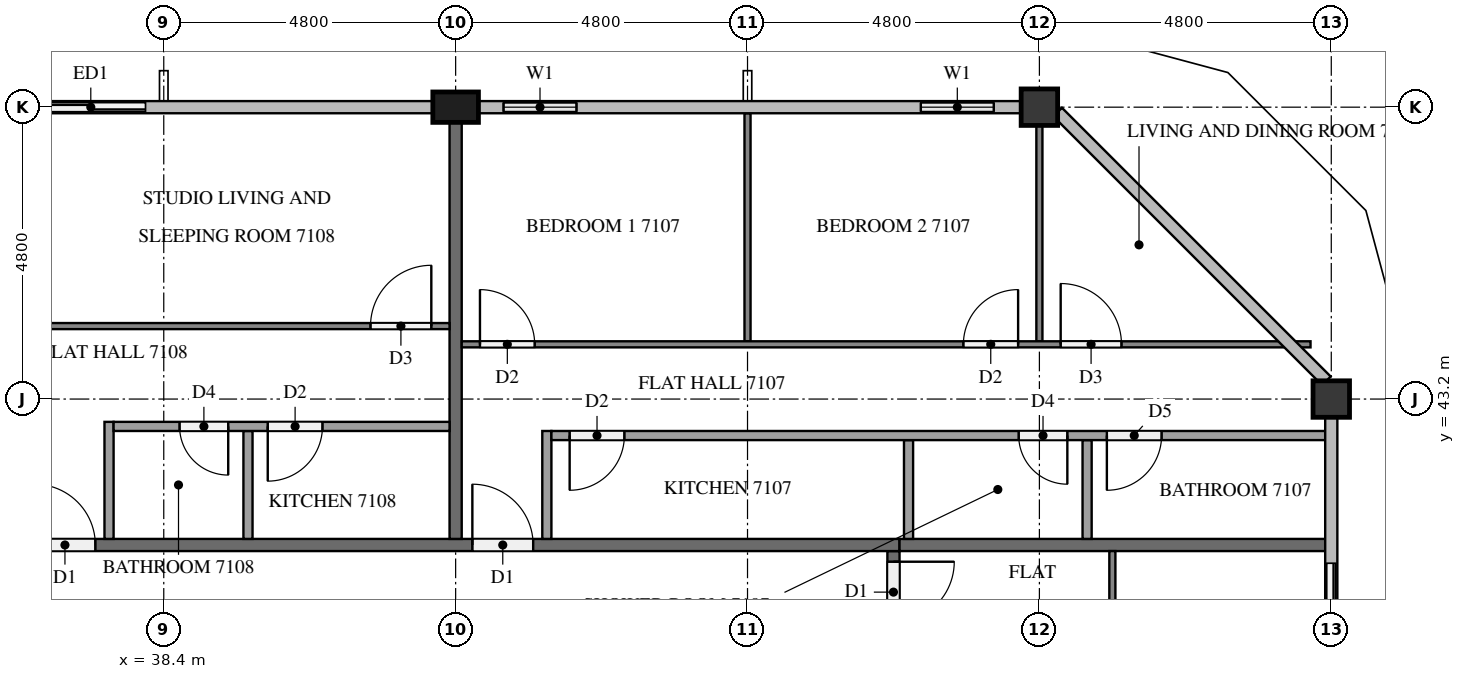
"""IFC4 building model, lengths in metres.
Left out: names, types, materials, properties, quantities, classifications, styles, units other than length and angle.
Written with IfcOpenShell. Run it as: python <this file> out.ifc"""

import sys

from ifc_helpers import new_model, si_unit, direction, frame, frame_2d, origin, origin_2d, place, context, subcontext, project, spatial, rectangle, extrude, element, fill, save


model = new_model("IFC4")
c1 = context("Model", 3, precision=1e-05, world=origin(), true_north=direction((0.0, 1.0)))
c2 = subcontext(c1, "Body", "Model", "MODEL_VIEW")
j1 = project(units=[si_unit("LENGTHUNIT", "METRE"), si_unit("PLANEANGLEUNIT", "RADIAN")], contexts=[c1])
p1 = place(None, origin())
s1 = spatial("IfcSite", under=j1, at=p1, CompositionType="ELEMENT")
p2 = place(p1, origin())
s2 = spatial("IfcBuilding", under=s1, at=p2, CompositionType="ELEMENT")
p3 = place(p2, frame((0.0, 0.0, 272.1)))
s3 = spatial("IfcBuildingStorey", under=s2, at=p3, CompositionType="ELEMENT", Elevation=272.1)
for number, where, z_axis, x_axis in (
    (1, (57.6, 43.2, 0.0), (0.0, 0.0, 1.0), (1.0, 0.0, 0.0)),
    (2, (52.8, 48.0, 0.0), (0.0, 0.0, 1.0), (1.0, 0.0, 0.0)),
):
    element("IfcColumn", number, at=place(p3, frame(where, z_axis=z_axis, x_axis=x_axis)), inside=s3, PredefinedType="COLUMN", context=c2, shape_type="SweptSolid", body=[
        extrude(rectangle(XDim=0.6, YDim=0.6, at=origin_2d()), origin(), (0.0, 0.0, 1.0), 3.2),
    ])
p4 = place(p3, frame((43.2, 48.0, 0.0), z_axis=(0.0, 0.0, 1.0), x_axis=(1.0, 0.0, 0.0)))
e3 = element("IfcColumn", 3, at=p4, inside=s3, PredefinedType="COLUMN", context=c2, shape_type="SweptSolid", body=[
    extrude(rectangle(XDim=0.75, YDim=0.5, at=origin_2d()), origin(), (0.0, 0.0, 1.0), 3.2),
])
p5 = place(p3, frame((57.6, 38.4, 0.0), z_axis=(0.0, 0.0, 1.0), x_axis=(0.0, 1.0, 0.0)))
e4 = element("IfcWall", 4, at=p5, inside=s3, PredefinedType="SOLIDWALL", context=c2, shape_type="SweptSolid", body=[
    extrude(rectangle(XDim=2.4, YDim=0.15, at=frame_2d((1.2, 0.0))), origin(), (0.0, 0.0, 1.0), 3.2),
])
p6 = place(p5, frame((0.3, 0.0, 0.0)))
e5 = element("IfcOpeningElement", 5, at=p6, cuts=e4, PredefinedType="OPENING", context=c2, shape_type="SweptSolid", body=[
    extrude(rectangle(XDim=1.8, YDim=2.4, at=frame_2d((0.9, 1.2))), frame((0.0, 0.085, 0.0), z_axis=(0.0, -1.0, 0.0), x_axis=(1.0, 0.0, 0.0)), (0.0, 0.0, 1.0), 0.17),
])
p7 = place(p3, frame((52.5, 48.0, 0.0), z_axis=(0.0, 0.0, 1.0), x_axis=(-1.0, 0.0, 0.0)))
e6 = element("IfcWall", 6, at=p7, inside=s3, PredefinedType="SOLIDWALL", context=c2, shape_type="SweptSolid", body=[
    extrude(rectangle(XDim=2.1, YDim=0.15, at=frame_2d((1.05, 0.0))), origin(), (0.0, 0.0, 1.0), 3.2),
])
p8 = place(p7, frame((0.45, 0.0, 0.9)))
e7 = element("IfcOpeningElement", 7, at=p8, cuts=e6, PredefinedType="OPENING", context=c2, shape_type="SweptSolid", body=[
    extrude(rectangle(XDim=1.2, YDim=1.4, at=frame_2d((0.6, 0.7))), frame((0.0, 0.085, 0.0), z_axis=(0.0, -1.0, 0.0), x_axis=(1.0, 0.0, 0.0)), (0.0, 0.0, 1.0), 0.17),
])
p9 = place(p3, frame((45.6, 48.0, 0.0), z_axis=(0.0, 0.0, 1.0), x_axis=(-1.0, 0.0, 0.0)))
e8 = element("IfcWall", 8, at=p9, inside=s3, PredefinedType="SOLIDWALL", context=c2, shape_type="SweptSolid", body=[
    extrude(rectangle(XDim=2.025, YDim=0.15, at=frame_2d((1.013, 0.0))), origin(), (0.0, 0.0, 1.0), 3.2),
])
p10 = place(p9, frame((0.413, 0.0, 0.9)))
e9 = element("IfcOpeningElement", 9, at=p10, cuts=e8, PredefinedType="OPENING", context=c2, shape_type="SweptSolid", body=[
    extrude(rectangle(XDim=1.2, YDim=1.4, at=frame_2d((0.6, 0.7))), frame((0.0, 0.085, 0.0), z_axis=(0.0, -1.0, 0.0), x_axis=(1.0, 0.0, 0.0)), (0.0, 0.0, 1.0), 0.17),
])
p11 = place(p3, frame((38.4, 48.0, 0.0), z_axis=(0.0, 0.0, 1.0), x_axis=(-1.0, 0.0, 0.0)))
e10 = element("IfcWall", 10, at=p11, inside=s3, PredefinedType="SOLIDWALL", context=c2, shape_type="SweptSolid", body=[
    extrude(rectangle(XDim=2.4, YDim=0.15, at=frame_2d((1.2, 0.0))), origin(), (0.0, 0.0, 1.0), 3.2),
])
p12 = place(p11, frame((0.3, 0.0, 0.0)))
e11 = element("IfcOpeningElement", 11, at=p12, cuts=e10, PredefinedType="OPENING", context=c2, shape_type="SweptSolid", body=[
    extrude(rectangle(XDim=1.8, YDim=2.4, at=frame_2d((0.9, 1.2))), frame((0.0, 0.085, 0.0), z_axis=(0.0, -1.0, 0.0), x_axis=(1.0, 0.0, 0.0)), (0.0, 0.0, 1.0), 0.17),
])
p13 = place(p3, frame((50.4, 40.7, 0.0), z_axis=(0.0, 0.0, 1.0), x_axis=(0.0, -1.0, 0.0)))
e12 = element("IfcWall", 12, at=p13, inside=s3, PredefinedType="PARTITIONING", context=c2, shape_type="SweptSolid", body=[
    extrude(rectangle(XDim=28.6, YDim=0.2, at=frame_2d((14.3, 0.0))), origin(), (0.0, 0.0, 1.0), 3.2),
])
p14 = place(p13, frame((27.425, 0.0, 0.0)))
e13 = element("IfcOpeningElement", 13, at=p14, cuts=e12, PredefinedType="OPENING", context=c2, shape_type="SweptSolid", body=[
    extrude(rectangle(XDim=1.0, YDim=2.1, at=frame_2d((0.5, 1.05))), frame((0.0, 0.11, 0.0), z_axis=(0.0, -1.0, 0.0), x_axis=(1.0, 0.0, 0.0)), (0.0, 0.0, 1.0), 0.22),
])
p15 = place(p13, frame((0.175, 0.0, 0.0)))
e14 = element("IfcOpeningElement", 14, at=p15, cuts=e12, PredefinedType="OPENING", context=c2, shape_type="SweptSolid", body=[
    extrude(rectangle(XDim=1.0, YDim=2.1, at=frame_2d((0.5, 1.05))), frame((0.0, 0.11, 0.0), z_axis=(0.0, -1.0, 0.0), x_axis=(1.0, 0.0, 0.0)), (0.0, 0.0, 1.0), 0.22),
])
p16 = place(p3, frame((11.9, 40.8, 0.0), z_axis=(0.0, 0.0, 1.0), x_axis=(1.0, 0.0, 0.0)))
e15 = element("IfcWall", 15, at=p16, inside=s3, PredefinedType="PARTITIONING", context=c2, shape_type="SweptSolid", body=[
    extrude(rectangle(XDim=38.6, YDim=0.2, at=frame_2d((19.3, 0.0))), origin(), (0.0, 0.0, 1.0), 3.2),
])
p17 = place(p16, frame((31.575, 0.0, 0.0)))
e16 = element("IfcOpeningElement", 16, at=p17, cuts=e15, PredefinedType="OPENING", context=c2, shape_type="SweptSolid", body=[
    extrude(rectangle(XDim=1.0, YDim=2.1, at=frame_2d((0.5, 1.05))), frame((0.0, 0.11, 0.0), z_axis=(0.0, -1.0, 0.0), x_axis=(1.0, 0.0, 0.0)), (0.0, 0.0, 1.0), 0.22),
])
p18 = place(p16, frame((24.375, 0.0, 0.0)))
e17 = element("IfcOpeningElement", 17, at=p18, cuts=e15, PredefinedType="OPENING", context=c2, shape_type="SweptSolid", body=[
    extrude(rectangle(XDim=1.0, YDim=2.1, at=frame_2d((0.5, 1.05))), frame((0.0, 0.11, 0.0), z_axis=(0.0, -1.0, 0.0), x_axis=(1.0, 0.0, 0.0)), (0.0, 0.0, 1.0), 0.22),
])
p19 = place(p16, frame((22.825, 0.0, 0.0)))
e18 = element("IfcOpeningElement", 18, at=p19, cuts=e15, PredefinedType="OPENING", context=c2, shape_type="SweptSolid", body=[
    extrude(rectangle(XDim=1.0, YDim=2.1, at=frame_2d((0.5, 1.05))), frame((0.0, 0.11, 0.0), z_axis=(0.0, -1.0, 0.0), x_axis=(1.0, 0.0, 0.0)), (0.0, 0.0, 1.0), 0.22),
])
p20 = place(p16, frame((0.375, 0.0, 0.0)))
e19 = element("IfcOpeningElement", 19, at=p20, cuts=e15, PredefinedType="OPENING", context=c2, shape_type="SweptSolid", body=[
    extrude(rectangle(XDim=1.0, YDim=2.1, at=frame_2d((0.5, 1.05))), frame((0.0, 0.11, 0.0), z_axis=(0.0, -1.0, 0.0), x_axis=(1.0, 0.0, 0.0)), (0.0, 0.0, 1.0), 0.22),
])
p21 = place(p3, frame((50.5, 40.8, 0.0), z_axis=(0.0, 0.0, 1.0), x_axis=(1.0, 0.0, 0.0)))
e20 = element("IfcWall", 20, at=p21, inside=s3, PredefinedType="PARTITIONING", context=c2, shape_type="SweptSolid", body=[
    extrude(rectangle(XDim=7.0, YDim=0.2, at=frame_2d((3.5, 0.0))), origin(), (0.0, 0.0, 1.0), 3.2),
])
p22 = place(p3, frame((43.2, 47.75, 0.0), z_axis=(0.0, 0.0, 1.0), x_axis=(0.0, -1.0, 0.0)))
e21 = element("IfcWall", 21, at=p22, inside=s3, PredefinedType="PARTITIONING", context=c2, shape_type="SweptSolid", body=[
    extrude(rectangle(XDim=6.85, YDim=0.2, at=frame_2d((3.425, 0.0))), origin(), (0.0, 0.0, 1.0), 3.2),
])
p23 = place(p3, frame((54.0, 40.7, 0.0), z_axis=(0.0, 0.0, 1.0), x_axis=(0.0, -1.0, 0.0)))
e22 = element("IfcWall", 22, at=p23, inside=s3, PredefinedType="PARTITIONING", context=c2, shape_type="SweptSolid", body=[
    extrude(rectangle(XDim=11.8, YDim=0.1, at=frame_2d((5.9, 0.0))), origin(), (0.0, 0.0, 1.0), 3.2),
])
p24 = place(p23, frame((5.75, 0.0, 0.0)))
e23 = element("IfcOpeningElement", 23, at=p24, cuts=e22, PredefinedType="OPENING", context=c2, shape_type="SweptSolid", body=[
    extrude(rectangle(XDim=1.0, YDim=2.1, at=frame_2d((0.5, 1.05))), frame((0.0, 0.06, 0.0), z_axis=(0.0, -1.0, 0.0), x_axis=(1.0, 0.0, 0.0)), (0.0, 0.0, 1.0), 0.12),
])
p25 = place(p23, frame((7.45, 0.0, 0.0)))
e24 = element("IfcOpeningElement", 24, at=p25, cuts=e22, PredefinedType="OPENING", context=c2, shape_type="SweptSolid", body=[
    extrude(rectangle(XDim=0.9, YDim=2.1, at=frame_2d((0.45, 1.05))), frame((0.0, 0.06, 0.0), z_axis=(0.0, -1.0, 0.0), x_axis=(1.0, 0.0, 0.0)), (0.0, 0.0, 1.0), 0.12),
])
p26 = place(p3, frame((48.0, 44.15, 0.0), z_axis=(0.0, 0.0, 1.0), x_axis=(0.0, 1.0, 0.0)))
e25 = element("IfcWall", 25, at=p26, inside=s3, PredefinedType="PARTITIONING", context=c2, shape_type="SweptSolid", body=[
    extrude(rectangle(XDim=3.75, YDim=0.1, at=frame_2d((1.875, 0.0))), origin(), (0.0, 0.0, 1.0), 3.2),
])
p27 = place(p3, frame((52.8, 44.15, 0.0), z_axis=(0.0, 0.0, 1.0), x_axis=(0.0, 1.0, 0.0)))
e26 = element("IfcWall", 26, at=p27, inside=s3, PredefinedType="PARTITIONING", context=c2, shape_type="SweptSolid", body=[
    extrude(rectangle(XDim=3.55, YDim=0.1, at=frame_2d((1.775, 0.0))), origin(), (0.0, 0.0, 1.0), 3.2),
])
p28 = place(p3, frame((43.3, 44.1, 0.0), z_axis=(0.0, 0.0, 1.0), x_axis=(1.0, 0.0, 0.0)))
e27 = element("IfcWall", 27, at=p28, inside=s3, PredefinedType="PARTITIONING", context=c2, shape_type="SweptSolid", body=[
    extrude(rectangle(XDim=13.959, YDim=0.1, at=frame_2d((6.979, 0.0))), origin(), (0.0, 0.0, 1.0), 3.2),
])
p29 = place(p28, frame((0.3, 0.0, 0.0)))
e28 = element("IfcOpeningElement", 28, at=p29, cuts=e27, PredefinedType="OPENING", context=c2, shape_type="SweptSolid", body=[
    extrude(rectangle(XDim=0.9, YDim=2.1, at=frame_2d((0.45, 1.05))), frame((0.0, 0.06, 0.0), z_axis=(0.0, -1.0, 0.0), x_axis=(1.0, 0.0, 0.0)), (0.0, 0.0, 1.0), 0.12),
])
p30 = place(p28, frame((8.25, 0.0, 0.0)))
e29 = element("IfcOpeningElement", 29, at=p30, cuts=e27, PredefinedType="OPENING", context=c2, shape_type="SweptSolid", body=[
    extrude(rectangle(XDim=0.9, YDim=2.1, at=frame_2d((0.45, 1.05))), frame((0.0, 0.06, 0.0), z_axis=(0.0, -1.0, 0.0), x_axis=(1.0, 0.0, 0.0)), (0.0, 0.0, 1.0), 0.12),
])
p31 = place(p28, frame((9.85, 0.0, 0.0)))
e30 = element("IfcOpeningElement", 30, at=p31, cuts=e27, PredefinedType="OPENING", context=c2, shape_type="SweptSolid", body=[
    extrude(rectangle(XDim=1.0, YDim=2.1, at=frame_2d((0.5, 1.05))), frame((0.0, 0.06, 0.0), z_axis=(0.0, -1.0, 0.0), x_axis=(1.0, 0.0, 0.0)), (0.0, 0.0, 1.0), 0.12),
])
for number, where, z_axis, x_axis in (
    (31, (50.648, 40.9, 0.0), (0.0, 0.0, 1.0), (0.0, 1.0, 0.0)),
    (32, (53.585, 40.9, 0.0), (0.0, 0.0, 1.0), (0.0, 1.0, 0.0)),
):
    element("IfcWall", number, at=place(p3, frame(where, z_axis=z_axis, x_axis=x_axis)), inside=s3, PredefinedType="PARTITIONING", context=c2, shape_type="SweptSolid", body=[
        extrude(rectangle(XDim=1.625, YDim=0.15, at=frame_2d((0.812, 0.0))), origin(), (0.0, 0.0, 1.0), 3.2),
    ])
p32 = place(p3, frame((44.7, 40.9, 0.0), z_axis=(0.0, 0.0, 1.0), x_axis=(0.0, 1.0, 0.0)))
e33 = element("IfcWall", 33, at=p32, inside=s3, PredefinedType="PARTITIONING", context=c2, shape_type="SweptSolid", body=[
    extrude(rectangle(XDim=1.775, YDim=0.15, at=frame_2d((0.888, 0.0))), origin(), (0.0, 0.0, 1.0), 3.2),
])
p33 = place(p3, frame((57.5, 42.6, 0.0), z_axis=(0.0, 0.0, 1.0), x_axis=(-1.0, 0.0, 0.0)))
e34 = element("IfcWall", 34, at=p33, inside=s3, PredefinedType="PARTITIONING", context=c2, shape_type="SweptSolid", body=[
    extrude(rectangle(XDim=12.725, YDim=0.15, at=frame_2d((6.363, 0.0))), origin(), (0.0, 0.0, 1.0), 3.2),
])
p34 = place(p33, frame((11.525, 0.0, 0.0)))
e35 = element("IfcOpeningElement", 35, at=p34, cuts=e34, PredefinedType="OPENING", context=c2, shape_type="SweptSolid", body=[
    extrude(rectangle(XDim=0.9, YDim=2.1, at=frame_2d((0.45, 1.05))), frame((0.0, 0.085, 0.0), z_axis=(0.0, -1.0, 0.0), x_axis=(1.0, 0.0, 0.0)), (0.0, 0.0, 1.0), 0.17),
])
p35 = place(p33, frame((4.24, 0.0, 0.0)))
e36 = element("IfcOpeningElement", 36, at=p35, cuts=e34, PredefinedType="OPENING", context=c2, shape_type="SweptSolid", body=[
    extrude(rectangle(XDim=0.8, YDim=2.1, at=frame_2d((0.4, 1.05))), frame((0.0, 0.085, 0.0), z_axis=(0.0, -1.0, 0.0), x_axis=(1.0, 0.0, 0.0)), (0.0, 0.0, 1.0), 0.17),
])
p36 = place(p33, frame((2.69, 0.0, 0.0)))
e37 = element("IfcOpeningElement", 37, at=p36, cuts=e34, PredefinedType="OPENING", context=c2, shape_type="SweptSolid", body=[
    extrude(rectangle(XDim=0.9, YDim=2.1, at=frame_2d((0.45, 1.05))), frame((0.0, 0.085, 0.0), z_axis=(0.0, -1.0, 0.0), x_axis=(1.0, 0.0, 0.0)), (0.0, 0.0, 1.0), 0.17),
])
p37 = place(p3, frame((36.1, 44.4, 0.0), z_axis=(0.0, 0.0, 1.0), x_axis=(1.0, 0.0, 0.0)))
e38 = element("IfcWall", 38, at=p37, inside=s3, PredefinedType="PARTITIONING", context=c2, shape_type="SweptSolid", body=[
    extrude(rectangle(XDim=7.0, YDim=0.1, at=frame_2d((3.5, 0.0))), origin(), (0.0, 0.0, 1.0), 3.2),
])
p38 = place(p37, frame((5.7, 0.0, 0.0)))
e39 = element("IfcOpeningElement", 39, at=p38, cuts=e38, PredefinedType="OPENING", context=c2, shape_type="SweptSolid", body=[
    extrude(rectangle(XDim=1.0, YDim=2.1, at=frame_2d((0.5, 1.05))), frame((0.0, 0.06, 0.0), z_axis=(0.0, -1.0, 0.0), x_axis=(1.0, 0.0, 0.0)), (0.0, 0.0, 1.0), 0.12),
])
p39 = place(p3, frame((39.785, 40.9, 0.0), z_axis=(0.0, 0.0, 1.0), x_axis=(0.0, 1.0, 0.0)))
e40 = element("IfcWall", 40, at=p39, inside=s3, PredefinedType="PARTITIONING", context=c2, shape_type="SweptSolid", body=[
    extrude(rectangle(XDim=1.775, YDim=0.15, at=frame_2d((0.888, 0.0))), origin(), (0.0, 0.0, 1.0), 3.2),
])
p40 = place(p3, frame((37.5, 40.9, 0.0), z_axis=(0.0, 0.0, 1.0), x_axis=(0.0, 1.0, 0.0)))
e41 = element("IfcWall", 41, at=p40, inside=s3, PredefinedType="PARTITIONING", context=c2, shape_type="SweptSolid", body=[
    extrude(rectangle(XDim=1.925, YDim=0.15, at=frame_2d((0.962, 0.0))), origin(), (0.0, 0.0, 1.0), 3.2),
])
p41 = place(p3, frame((43.1, 42.75, 0.0), z_axis=(0.0, 0.0, 1.0), x_axis=(-1.0, 0.0, 0.0)))
e42 = element("IfcWall", 42, at=p41, inside=s3, PredefinedType="PARTITIONING", context=c2, shape_type="SweptSolid", body=[
    extrude(rectangle(XDim=5.525, YDim=0.15, at=frame_2d((2.763, 0.0))), origin(), (0.0, 0.0, 1.0), 3.2),
])
p42 = place(p41, frame((3.64, 0.0, 0.0)))
e43 = element("IfcOpeningElement", 43, at=p42, cuts=e42, PredefinedType="OPENING", context=c2, shape_type="SweptSolid", body=[
    extrude(rectangle(XDim=0.8, YDim=2.1, at=frame_2d((0.4, 1.05))), frame((0.0, 0.085, 0.0), z_axis=(0.0, -1.0, 0.0), x_axis=(1.0, 0.0, 0.0)), (0.0, 0.0, 1.0), 0.17),
])
p43 = place(p41, frame((2.09, 0.0, 0.0)))
e44 = element("IfcOpeningElement", 44, at=p43, cuts=e42, PredefinedType="OPENING", context=c2, shape_type="SweptSolid", body=[
    extrude(rectangle(XDim=0.9, YDim=2.1, at=frame_2d((0.45, 1.05))), frame((0.0, 0.085, 0.0), z_axis=(0.0, -1.0, 0.0), x_axis=(1.0, 0.0, 0.0)), (0.0, 0.0, 1.0), 0.17),
])
p44 = place(p6, origin())
e45 = element("IfcDoor", 45, at=p44, inside=s3, OperationType="SLIDING_TO_LEFT", PredefinedType="DOOR", context=c2, shape_type="SweptSolid", body=[
    extrude(rectangle(XDim=1.8, YDim=2.4, at=frame_2d((0.9, 1.2))), frame((0.0, 0.025, 0.0), z_axis=(0.0, -1.0, 0.0), x_axis=(1.0, 0.0, 0.0)), (0.0, 0.0, 1.0), 0.05),
])
fill(e5, e45)
p45 = place(p8, origin())
e46 = element("IfcWindow", 46, at=p45, inside=s3, PartitioningType="SINGLE_PANEL", PredefinedType="WINDOW", context=c2, shape_type="SweptSolid", body=[
    extrude(rectangle(XDim=1.2, YDim=1.4, at=frame_2d((0.6, 0.7))), frame((0.0, 0.03, 0.0), z_axis=(0.0, -1.0, 0.0), x_axis=(1.0, 0.0, 0.0)), (0.0, 0.0, 1.0), 0.06),
])
fill(e7, e46)
p46 = place(p10, origin())
e47 = element("IfcWindow", 47, at=p46, inside=s3, PartitioningType="SINGLE_PANEL", PredefinedType="WINDOW", context=c2, shape_type="SweptSolid", body=[
    extrude(rectangle(XDim=1.2, YDim=1.4, at=frame_2d((0.6, 0.7))), frame((0.0, 0.03, 0.0), z_axis=(0.0, -1.0, 0.0), x_axis=(1.0, 0.0, 0.0)), (0.0, 0.0, 1.0), 0.06),
])
fill(e9, e47)
p47 = place(p12, origin())
e48 = element("IfcDoor", 48, at=p47, inside=s3, OperationType="SLIDING_TO_RIGHT", PredefinedType="DOOR", context=c2, shape_type="SweptSolid", body=[
    extrude(rectangle(XDim=1.8, YDim=2.4, at=frame_2d((0.9, 1.2))), frame((0.0, 0.025, 0.0), z_axis=(0.0, -1.0, 0.0), x_axis=(1.0, 0.0, 0.0)), (0.0, 0.0, 1.0), 0.05),
])
fill(e11, e48)
p48 = place(p15, origin())
e49 = element("IfcDoor", 49, at=p48, inside=s3, OperationType="SINGLE_SWING_LEFT", PredefinedType="DOOR", context=c2, shape_type="SweptSolid", body=[
    extrude(rectangle(XDim=1.0, YDim=2.1, at=frame_2d((0.5, 1.05))), frame((0.0, 0.025, 0.0), z_axis=(0.0, -1.0, 0.0), x_axis=(1.0, 0.0, 0.0)), (0.0, 0.0, 1.0), 0.05),
])
fill(e14, e49)
p49 = place(p17, origin())
e50 = element("IfcDoor", 50, at=p49, inside=s3, OperationType="SINGLE_SWING_LEFT", PredefinedType="DOOR", context=c2, shape_type="SweptSolid", body=[
    extrude(rectangle(XDim=1.0, YDim=2.1, at=frame_2d((0.5, 1.05))), frame((0.0, 0.025, 0.0), z_axis=(0.0, -1.0, 0.0), x_axis=(1.0, 0.0, 0.0)), (0.0, 0.0, 1.0), 0.05),
])
fill(e16, e50)
p50 = place(p18, origin())
e51 = element("IfcDoor", 51, at=p50, inside=s3, OperationType="SINGLE_SWING_LEFT", PredefinedType="DOOR", context=c2, shape_type="SweptSolid", body=[
    extrude(rectangle(XDim=1.0, YDim=2.1, at=frame_2d((0.5, 1.05))), frame((0.0, 0.025, 0.0), z_axis=(0.0, -1.0, 0.0), x_axis=(1.0, 0.0, 0.0)), (0.0, 0.0, 1.0), 0.05),
])
fill(e17, e51)
p51 = place(p29, origin())
e52 = element("IfcDoor", 52, at=p51, inside=s3, OperationType="SINGLE_SWING_LEFT", PredefinedType="DOOR", context=c2, shape_type="SweptSolid", body=[
    extrude(rectangle(XDim=0.9, YDim=2.1, at=frame_2d((0.45, 1.05))), frame((0.0, 0.025, 0.0), z_axis=(0.0, -1.0, 0.0), x_axis=(1.0, 0.0, 0.0)), (0.0, 0.0, 1.0), 0.05),
])
fill(e28, e52)
p52 = place(p30, origin())
e53 = element("IfcDoor", 53, at=p52, inside=s3, OperationType="SINGLE_SWING_RIGHT", PredefinedType="DOOR", context=c2, shape_type="SweptSolid", body=[
    extrude(rectangle(XDim=0.9, YDim=2.1, at=frame_2d((0.45, 1.05))), frame((0.0, 0.025, 0.0), z_axis=(0.0, -1.0, 0.0), x_axis=(1.0, 0.0, 0.0)), (0.0, 0.0, 1.0), 0.05),
])
fill(e29, e53)
p53 = place(p31, origin())
e54 = element("IfcDoor", 54, at=p53, inside=s3, OperationType="SINGLE_SWING_LEFT", PredefinedType="DOOR", context=c2, shape_type="SweptSolid", body=[
    extrude(rectangle(XDim=1.0, YDim=2.1, at=frame_2d((0.5, 1.05))), frame((0.0, 0.025, 0.0), z_axis=(0.0, -1.0, 0.0), x_axis=(1.0, 0.0, 0.0)), (0.0, 0.0, 1.0), 0.05),
])
fill(e30, e54)
p54 = place(p34, origin())
e55 = element("IfcDoor", 55, at=p54, inside=s3, OperationType="SINGLE_SWING_RIGHT", PredefinedType="DOOR", context=c2, shape_type="SweptSolid", body=[
    extrude(rectangle(XDim=0.9, YDim=2.1, at=frame_2d((0.45, 1.05))), frame((0.0, 0.025, 0.0), z_axis=(0.0, -1.0, 0.0), x_axis=(1.0, 0.0, 0.0)), (0.0, 0.0, 1.0), 0.05),
])
fill(e35, e55)
p55 = place(p35, origin())
e56 = element("IfcDoor", 56, at=p55, inside=s3, OperationType="SINGLE_SWING_LEFT", PredefinedType="DOOR", context=c2, shape_type="SweptSolid", body=[
    extrude(rectangle(XDim=0.8, YDim=2.1, at=frame_2d((0.4, 1.05))), frame((0.0, 0.025, 0.0), z_axis=(0.0, -1.0, 0.0), x_axis=(1.0, 0.0, 0.0)), (0.0, 0.0, 1.0), 0.05),
])
fill(e36, e56)
p56 = place(p36, origin())
e57 = element("IfcDoor", 57, at=p56, inside=s3, OperationType="SINGLE_SWING_RIGHT", PredefinedType="DOOR", context=c2, shape_type="SweptSolid", body=[
    extrude(rectangle(XDim=0.9, YDim=2.1, at=frame_2d((0.45, 1.05))), frame((0.0, 0.025, 0.0), z_axis=(0.0, -1.0, 0.0), x_axis=(1.0, 0.0, 0.0)), (0.0, 0.0, 1.0), 0.05),
])
fill(e37, e57)
p57 = place(p38, origin())
e58 = element("IfcDoor", 58, at=p57, inside=s3, OperationType="SINGLE_SWING_RIGHT", PredefinedType="DOOR", context=c2, shape_type="SweptSolid", body=[
    extrude(rectangle(XDim=1.0, YDim=2.1, at=frame_2d((0.5, 1.05))), frame((0.0, 0.025, 0.0), z_axis=(0.0, -1.0, 0.0), x_axis=(1.0, 0.0, 0.0)), (0.0, 0.0, 1.0), 0.05),
])
fill(e39, e58)
p58 = place(p42, origin())
e59 = element("IfcDoor", 59, at=p58, inside=s3, OperationType="SINGLE_SWING_LEFT", PredefinedType="DOOR", context=c2, shape_type="SweptSolid", body=[
    extrude(rectangle(XDim=0.8, YDim=2.1, at=frame_2d((0.4, 1.05))), frame((0.0, 0.025, 0.0), z_axis=(0.0, -1.0, 0.0), x_axis=(1.0, 0.0, 0.0)), (0.0, 0.0, 1.0), 0.05),
])
fill(e43, e59)
p59 = place(p43, origin())
e60 = element("IfcDoor", 60, at=p59, inside=s3, OperationType="SINGLE_SWING_RIGHT", PredefinedType="DOOR", context=c2, shape_type="SweptSolid", body=[
    extrude(rectangle(XDim=0.9, YDim=2.1, at=frame_2d((0.45, 1.05))), frame((0.0, 0.025, 0.0), z_axis=(0.0, -1.0, 0.0), x_axis=(1.0, 0.0, 0.0)), (0.0, 0.0, 1.0), 0.05),
])
fill(e44, e60)
save(model, sys.argv[1])
